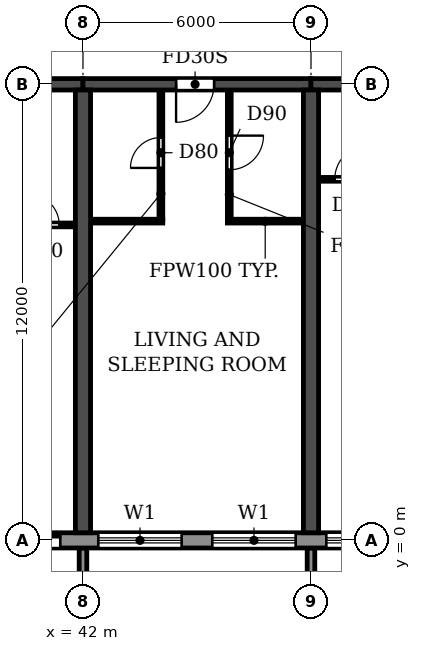
"""IFC4 building model, lengths in metres.
Left out: names, types, materials, properties, quantities, classifications, styles, units other than length and angle.
Written with IfcOpenShell. Run it as: python <this file> out.ifc"""

import sys

from ifc_helpers import new_model, si_unit, direction, frame, frame_2d, origin, place, context, subcontext, project, spatial, polyline, rectangle, outline, extrude, source, transform, mapped, element, fill, save


model = new_model("IFC4")
c1 = context("Model", 3, precision=1e-05, world=origin(), true_north=direction((0.0, 1.0)))
c2 = subcontext(c1, "Body", "Model", "MODEL_VIEW")
j1 = project(units=[si_unit("LENGTHUNIT", "METRE"), si_unit("PLANEANGLEUNIT", "RADIAN")], contexts=[c1])
p1 = place(None, origin())
s1 = spatial("IfcSite", under=j1, at=p1, CompositionType="ELEMENT")
p2 = place(p1, origin())
s2 = spatial("IfcBuilding", under=s1, at=p2, CompositionType="ELEMENT")
p3 = place(p2, frame((0.0, 0.0, 49.8)))
s3 = spatial("IfcBuildingStorey", under=s2, at=p3, CompositionType="ELEMENT", Elevation=49.8)
for number, where, z_axis, x_axis in (
    (1, (42.0, 0.2, 0.0), (0.0, 0.0, 1.0), (0.0, 1.0, 0.0)),
    (2, (48.0, 0.2, 0.0), (0.0, 0.0, 1.0), (0.0, 1.0, 0.0)),
):
    element("IfcWall", number, at=place(p3, frame(where, z_axis=z_axis, x_axis=x_axis)), inside=s3, PredefinedType="SHEAR", context=c2, shape_type="SweptSolid", body=[
        extrude(rectangle(XDim=11.65, YDim=0.4, at=frame_2d((5.825, 0.0))), origin(), (0.0, 0.0, 1.0), 3.0),
    ])
p4 = place(p3, frame((36.0, 12.0, 0.0), z_axis=(0.0, 0.0, 1.0), x_axis=(1.0, 0.0, 0.0)))
e3 = element("IfcWall", 3, at=p4, inside=s3, PredefinedType="SHEAR", context=c2, shape_type="SweptSolid", body=[
    extrude(rectangle(XDim=6.0, YDim=0.3, at=frame_2d((3.0, 0.0))), origin(), (0.0, 0.0, 1.0), 2.4),
])
p5 = place(p4, frame((2.55, 0.0, 0.0)))
e4 = element("IfcOpeningElement", 4, at=p5, cuts=e3, PredefinedType="OPENING", context=c2, shape_type="SweptSolid", body=[
    extrude(rectangle(XDim=1.0, YDim=2.1, at=frame_2d((0.5, 1.05))), frame((0.0, 0.16, 0.0), z_axis=(0.0, -1.0, 0.0), x_axis=(1.0, 0.0, 0.0)), (0.0, 0.0, 1.0), 0.32),
])
p6 = place(p3, frame((42.0, 12.0, 0.0), z_axis=(0.0, 0.0, 1.0), x_axis=(1.0, 0.0, 0.0)))
e5 = element("IfcWall", 5, at=p6, inside=s3, PredefinedType="SHEAR", context=c2, shape_type="SweptSolid", body=[
    extrude(rectangle(XDim=6.0, YDim=0.3, at=frame_2d((3.0, 0.0))), origin(), (0.0, 0.0, 1.0), 2.4),
])
p7 = place(p6, frame((2.45, 0.0, 0.0)))
e6 = element("IfcOpeningElement", 6, at=p7, cuts=e5, PredefinedType="OPENING", context=c2, shape_type="SweptSolid", body=[
    extrude(rectangle(XDim=1.0, YDim=2.1, at=frame_2d((0.5, 1.05))), frame((0.0, 0.16, 0.0), z_axis=(0.0, -1.0, 0.0), x_axis=(1.0, 0.0, 0.0)), (0.0, 0.0, 1.0), 0.32),
])
p8 = place(p3, frame((48.0, 12.0, 0.0), z_axis=(0.0, 0.0, 1.0), x_axis=(1.0, 0.0, 0.0)))
e7 = element("IfcWall", 7, at=p8, inside=s3, PredefinedType="SHEAR", context=c2, shape_type="SweptSolid", body=[
    extrude(rectangle(XDim=6.0, YDim=0.3, at=frame_2d((3.0, 0.0))), origin(), (0.0, 0.0, 1.0), 2.4),
])
p9 = place(p8, frame((2.55, 0.0, 0.0)))
e8 = element("IfcOpeningElement", 8, at=p9, cuts=e7, PredefinedType="OPENING", context=c2, shape_type="SweptSolid", body=[
    extrude(rectangle(XDim=1.0, YDim=2.1, at=frame_2d((0.5, 1.05))), frame((0.0, 0.16, 0.0), z_axis=(0.0, -1.0, 0.0), x_axis=(1.0, 0.0, 0.0)), (0.0, 0.0, 1.0), 0.32),
])
p10 = place(p3, frame((4.683, 0.0, 0.0), z_axis=(0.0, 0.0, 1.0), x_axis=(1.0, 0.0, 0.0)))
e9 = element("IfcWall", 9, at=p10, inside=s3, PredefinedType="STANDARD", context=c2, shape_type="SweptSolid", body=[
    extrude(rectangle(XDim=92.634, YDim=0.4, at=frame_2d((46.317, 0.0))), origin(), (0.0, 0.0, 1.0), 3.0),
])
p11 = place(p10, frame((1.717, 0.0, 0.9)))
e10 = element("IfcOpeningElement", 10, at=p11, cuts=e9, PredefinedType="OPENING", context=c2, shape_type="SweptSolid", body=[
    extrude(rectangle(XDim=2.2, YDim=1.5, at=frame_2d((1.1, 0.75))), frame((0.0, 0.21, 0.0), z_axis=(0.0, -1.0, 0.0), x_axis=(1.0, 0.0, 0.0)), (0.0, 0.0, 1.0), 0.42),
])
p12 = place(p10, frame((4.717, 0.0, 0.9)))
e11 = element("IfcOpeningElement", 11, at=p12, cuts=e9, PredefinedType="OPENING", context=c2, shape_type="SweptSolid", body=[
    extrude(rectangle(XDim=2.2, YDim=1.5, at=frame_2d((1.1, 0.75))), frame((0.0, 0.21, 0.0), z_axis=(0.0, -1.0, 0.0), x_axis=(1.0, 0.0, 0.0)), (0.0, 0.0, 1.0), 0.42),
])
p13 = place(p10, frame((7.717, 0.0, 0.9)))
e12 = element("IfcOpeningElement", 12, at=p13, cuts=e9, PredefinedType="OPENING", context=c2, shape_type="SweptSolid", body=[
    extrude(rectangle(XDim=2.2, YDim=1.5, at=frame_2d((1.1, 0.75))), frame((0.0, 0.21, 0.0), z_axis=(0.0, -1.0, 0.0), x_axis=(1.0, 0.0, 0.0)), (0.0, 0.0, 1.0), 0.42),
])
p14 = place(p10, frame((10.917, 0.0, 0.0)))
e13 = element("IfcOpeningElement", 13, at=p14, cuts=e9, PredefinedType="OPENING", context=c2, shape_type="SweptSolid", body=[
    extrude(rectangle(XDim=1.8, YDim=2.4, at=frame_2d((0.9, 1.2))), frame((0.0, 0.21, 0.0), z_axis=(0.0, -1.0, 0.0), x_axis=(1.0, 0.0, 0.0)), (0.0, 0.0, 1.0), 0.42),
])
p15 = place(p10, frame((13.717, 0.0, 0.9)))
e14 = element("IfcOpeningElement", 14, at=p15, cuts=e9, PredefinedType="OPENING", context=c2, shape_type="SweptSolid", body=[
    extrude(rectangle(XDim=2.2, YDim=1.5, at=frame_2d((1.1, 0.75))), frame((0.0, 0.21, 0.0), z_axis=(0.0, -1.0, 0.0), x_axis=(1.0, 0.0, 0.0)), (0.0, 0.0, 1.0), 0.42),
])
p16 = place(p10, frame((16.717, 0.0, 0.9)))
e15 = element("IfcOpeningElement", 15, at=p16, cuts=e9, PredefinedType="OPENING", context=c2, shape_type="SweptSolid", body=[
    extrude(rectangle(XDim=2.2, YDim=1.5, at=frame_2d((1.1, 0.75))), frame((0.0, 0.21, 0.0), z_axis=(0.0, -1.0, 0.0), x_axis=(1.0, 0.0, 0.0)), (0.0, 0.0, 1.0), 0.42),
])
p17 = place(p10, frame((19.917, 0.0, 0.0)))
e16 = element("IfcOpeningElement", 16, at=p17, cuts=e9, PredefinedType="OPENING", context=c2, shape_type="SweptSolid", body=[
    extrude(rectangle(XDim=1.8, YDim=2.4, at=frame_2d((0.9, 1.2))), frame((0.0, 0.21, 0.0), z_axis=(0.0, -1.0, 0.0), x_axis=(1.0, 0.0, 0.0)), (0.0, 0.0, 1.0), 0.42),
])
p18 = place(p10, frame((22.717, 0.0, 0.9)))
e17 = element("IfcOpeningElement", 17, at=p18, cuts=e9, PredefinedType="OPENING", context=c2, shape_type="SweptSolid", body=[
    extrude(rectangle(XDim=2.2, YDim=1.5, at=frame_2d((1.1, 0.75))), frame((0.0, 0.21, 0.0), z_axis=(0.0, -1.0, 0.0), x_axis=(1.0, 0.0, 0.0)), (0.0, 0.0, 1.0), 0.42),
])
p19 = place(p10, frame((25.717, 0.0, 0.9)))
e18 = element("IfcOpeningElement", 18, at=p19, cuts=e9, PredefinedType="OPENING", context=c2, shape_type="SweptSolid", body=[
    extrude(rectangle(XDim=2.2, YDim=1.5, at=frame_2d((1.1, 0.75))), frame((0.0, 0.21, 0.0), z_axis=(0.0, -1.0, 0.0), x_axis=(1.0, 0.0, 0.0)), (0.0, 0.0, 1.0), 0.42),
])
p20 = place(p10, frame((28.717, 0.0, 0.9)))
e19 = element("IfcOpeningElement", 19, at=p20, cuts=e9, PredefinedType="OPENING", context=c2, shape_type="SweptSolid", body=[
    extrude(rectangle(XDim=2.2, YDim=1.5, at=frame_2d((1.1, 0.75))), frame((0.0, 0.21, 0.0), z_axis=(0.0, -1.0, 0.0), x_axis=(1.0, 0.0, 0.0)), (0.0, 0.0, 1.0), 0.42),
])
p21 = place(p10, frame((31.717, 0.0, 0.9)))
e20 = element("IfcOpeningElement", 20, at=p21, cuts=e9, PredefinedType="OPENING", context=c2, shape_type="SweptSolid", body=[
    extrude(rectangle(XDim=2.2, YDim=1.5, at=frame_2d((1.1, 0.75))), frame((0.0, 0.21, 0.0), z_axis=(0.0, -1.0, 0.0), x_axis=(1.0, 0.0, 0.0)), (0.0, 0.0, 1.0), 0.42),
])
p22 = place(p10, frame((34.917, 0.0, 0.0)))
e21 = element("IfcOpeningElement", 21, at=p22, cuts=e9, PredefinedType="OPENING", context=c2, shape_type="SweptSolid", body=[
    extrude(rectangle(XDim=1.8, YDim=2.4, at=frame_2d((0.9, 1.2))), frame((0.0, 0.21, 0.0), z_axis=(0.0, -1.0, 0.0), x_axis=(1.0, 0.0, 0.0)), (0.0, 0.0, 1.0), 0.42),
])
p23 = place(p10, frame((37.717, 0.0, 0.9)))
e22 = element("IfcOpeningElement", 22, at=p23, cuts=e9, PredefinedType="OPENING", context=c2, shape_type="SweptSolid", body=[
    extrude(rectangle(XDim=2.2, YDim=1.5, at=frame_2d((1.1, 0.75))), frame((0.0, 0.21, 0.0), z_axis=(0.0, -1.0, 0.0), x_axis=(1.0, 0.0, 0.0)), (0.0, 0.0, 1.0), 0.42),
])
p24 = place(p10, frame((40.717, 0.0, 0.9)))
e23 = element("IfcOpeningElement", 23, at=p24, cuts=e9, PredefinedType="OPENING", context=c2, shape_type="SweptSolid", body=[
    extrude(rectangle(XDim=2.2, YDim=1.5, at=frame_2d((1.1, 0.75))), frame((0.0, 0.21, 0.0), z_axis=(0.0, -1.0, 0.0), x_axis=(1.0, 0.0, 0.0)), (0.0, 0.0, 1.0), 0.42),
])
p25 = place(p10, frame((43.717, 0.0, 0.9)))
e24 = element("IfcOpeningElement", 24, at=p25, cuts=e9, PredefinedType="OPENING", context=c2, shape_type="SweptSolid", body=[
    extrude(rectangle(XDim=2.2, YDim=1.5, at=frame_2d((1.1, 0.75))), frame((0.0, 0.21, 0.0), z_axis=(0.0, -1.0, 0.0), x_axis=(1.0, 0.0, 0.0)), (0.0, 0.0, 1.0), 0.42),
])
p26 = place(p10, frame((46.917, 0.0, 0.0)))
e25 = element("IfcOpeningElement", 25, at=p26, cuts=e9, PredefinedType="OPENING", context=c2, shape_type="SweptSolid", body=[
    extrude(rectangle(XDim=1.8, YDim=2.4, at=frame_2d((0.9, 1.2))), frame((0.0, 0.21, 0.0), z_axis=(0.0, -1.0, 0.0), x_axis=(1.0, 0.0, 0.0)), (0.0, 0.0, 1.0), 0.42),
])
p27 = place(p10, frame((49.717, 0.0, 0.9)))
e26 = element("IfcOpeningElement", 26, at=p27, cuts=e9, PredefinedType="OPENING", context=c2, shape_type="SweptSolid", body=[
    extrude(rectangle(XDim=2.2, YDim=1.5, at=frame_2d((1.1, 0.75))), frame((0.0, 0.21, 0.0), z_axis=(0.0, -1.0, 0.0), x_axis=(1.0, 0.0, 0.0)), (0.0, 0.0, 1.0), 0.42),
])
p28 = place(p10, frame((52.717, 0.0, 0.9)))
e27 = element("IfcOpeningElement", 27, at=p28, cuts=e9, PredefinedType="OPENING", context=c2, shape_type="SweptSolid", body=[
    extrude(rectangle(XDim=2.2, YDim=1.5, at=frame_2d((1.1, 0.75))), frame((0.0, 0.21, 0.0), z_axis=(0.0, -1.0, 0.0), x_axis=(1.0, 0.0, 0.0)), (0.0, 0.0, 1.0), 0.42),
])
p29 = place(p10, frame((55.717, 0.0, 0.9)))
e28 = element("IfcOpeningElement", 28, at=p29, cuts=e9, PredefinedType="OPENING", context=c2, shape_type="SweptSolid", body=[
    extrude(rectangle(XDim=2.2, YDim=1.5, at=frame_2d((1.1, 0.75))), frame((0.0, 0.21, 0.0), z_axis=(0.0, -1.0, 0.0), x_axis=(1.0, 0.0, 0.0)), (0.0, 0.0, 1.0), 0.42),
])
p30 = place(p10, frame((58.917, 0.0, 0.0)))
e29 = element("IfcOpeningElement", 29, at=p30, cuts=e9, PredefinedType="OPENING", context=c2, shape_type="SweptSolid", body=[
    extrude(rectangle(XDim=1.8, YDim=2.4, at=frame_2d((0.9, 1.2))), frame((0.0, 0.21, 0.0), z_axis=(0.0, -1.0, 0.0), x_axis=(1.0, 0.0, 0.0)), (0.0, 0.0, 1.0), 0.42),
])
p31 = place(p10, frame((61.717, 0.0, 0.9)))
e30 = element("IfcOpeningElement", 30, at=p31, cuts=e9, PredefinedType="OPENING", context=c2, shape_type="SweptSolid", body=[
    extrude(rectangle(XDim=2.2, YDim=1.5, at=frame_2d((1.1, 0.75))), frame((0.0, 0.21, 0.0), z_axis=(0.0, -1.0, 0.0), x_axis=(1.0, 0.0, 0.0)), (0.0, 0.0, 1.0), 0.42),
])
p32 = place(p10, frame((64.717, 0.0, 0.9)))
e31 = element("IfcOpeningElement", 31, at=p32, cuts=e9, PredefinedType="OPENING", context=c2, shape_type="SweptSolid", body=[
    extrude(rectangle(XDim=2.2, YDim=1.5, at=frame_2d((1.1, 0.75))), frame((0.0, 0.21, 0.0), z_axis=(0.0, -1.0, 0.0), x_axis=(1.0, 0.0, 0.0)), (0.0, 0.0, 1.0), 0.42),
])
p33 = place(p10, frame((67.717, 0.0, 0.9)))
e32 = element("IfcOpeningElement", 32, at=p33, cuts=e9, PredefinedType="OPENING", context=c2, shape_type="SweptSolid", body=[
    extrude(rectangle(XDim=2.2, YDim=1.5, at=frame_2d((1.1, 0.75))), frame((0.0, 0.21, 0.0), z_axis=(0.0, -1.0, 0.0), x_axis=(1.0, 0.0, 0.0)), (0.0, 0.0, 1.0), 0.42),
])
p34 = place(p10, frame((70.917, 0.0, 0.0)))
e33 = element("IfcOpeningElement", 33, at=p34, cuts=e9, PredefinedType="OPENING", context=c2, shape_type="SweptSolid", body=[
    extrude(rectangle(XDim=1.8, YDim=2.4, at=frame_2d((0.9, 1.2))), frame((0.0, 0.21, 0.0), z_axis=(0.0, -1.0, 0.0), x_axis=(1.0, 0.0, 0.0)), (0.0, 0.0, 1.0), 0.42),
])
p35 = place(p10, frame((73.717, 0.0, 0.9)))
e34 = element("IfcOpeningElement", 34, at=p35, cuts=e9, PredefinedType="OPENING", context=c2, shape_type="SweptSolid", body=[
    extrude(rectangle(XDim=2.2, YDim=1.5, at=frame_2d((1.1, 0.75))), frame((0.0, 0.21, 0.0), z_axis=(0.0, -1.0, 0.0), x_axis=(1.0, 0.0, 0.0)), (0.0, 0.0, 1.0), 0.42),
])
p36 = place(p10, frame((76.717, 0.0, 0.9)))
e35 = element("IfcOpeningElement", 35, at=p36, cuts=e9, PredefinedType="OPENING", context=c2, shape_type="SweptSolid", body=[
    extrude(rectangle(XDim=2.2, YDim=1.5, at=frame_2d((1.1, 0.75))), frame((0.0, 0.21, 0.0), z_axis=(0.0, -1.0, 0.0), x_axis=(1.0, 0.0, 0.0)), (0.0, 0.0, 1.0), 0.42),
])
p37 = place(p10, frame((79.717, 0.0, 0.9)))
e36 = element("IfcOpeningElement", 36, at=p37, cuts=e9, PredefinedType="OPENING", context=c2, shape_type="SweptSolid", body=[
    extrude(rectangle(XDim=2.2, YDim=1.5, at=frame_2d((1.1, 0.75))), frame((0.0, 0.21, 0.0), z_axis=(0.0, -1.0, 0.0), x_axis=(1.0, 0.0, 0.0)), (0.0, 0.0, 1.0), 0.42),
])
p38 = place(p10, frame((82.917, 0.0, 0.0)))
e37 = element("IfcOpeningElement", 37, at=p38, cuts=e9, PredefinedType="OPENING", context=c2, shape_type="SweptSolid", body=[
    extrude(rectangle(XDim=1.8, YDim=2.4, at=frame_2d((0.9, 1.2))), frame((0.0, 0.21, 0.0), z_axis=(0.0, -1.0, 0.0), x_axis=(1.0, 0.0, 0.0)), (0.0, 0.0, 1.0), 0.42),
])
p39 = place(p10, frame((85.717, 0.0, 0.9)))
e38 = element("IfcOpeningElement", 38, at=p39, cuts=e9, PredefinedType="OPENING", context=c2, shape_type="SweptSolid", body=[
    extrude(rectangle(XDim=2.2, YDim=1.5, at=frame_2d((1.1, 0.75))), frame((0.0, 0.21, 0.0), z_axis=(0.0, -1.0, 0.0), x_axis=(1.0, 0.0, 0.0)), (0.0, 0.0, 1.0), 0.42),
])
p40 = place(p10, frame((88.717, 0.0, 0.9)))
e39 = element("IfcOpeningElement", 39, at=p40, cuts=e9, PredefinedType="OPENING", context=c2, shape_type="SweptSolid", body=[
    extrude(rectangle(XDim=2.2, YDim=1.5, at=frame_2d((1.1, 0.75))), frame((0.0, 0.21, 0.0), z_axis=(0.0, -1.0, 0.0), x_axis=(1.0, 0.0, 0.0)), (0.0, 0.0, 1.0), 0.42),
])
m1 = source(origin(), c2, "Body", "SweptSolid", [
    extrude(outline(polyline([(0.0, 0.0), (0.2, 0.0), (0.2, 1.65), (0.0, 1.65), (0.0, 0.0)])), origin(), (0.0, 0.0, 1.0), 3.1),
])
for number, where in (
    (40, (41.9, -1.85, 0.0)),
    (41, (47.9, -1.85, 0.0)),
):
    element("IfcWall", number, at=place(p3, frame(where)), inside=s3, PredefinedType="STANDARD", context=c2, shape_type="MappedRepresentation", body=[
        mapped(m1, transform((0.0, 0.0, 0.0))),
    ])
p41 = place(p3, frame((39.9, 8.3, 0.0), z_axis=(0.0, 0.0, 1.0), x_axis=(1.0, 0.0, 0.0)))
e42 = element("IfcWall", 42, at=p41, inside=s3, PredefinedType="PARTITIONING", context=c2, shape_type="SweptSolid", body=[
    extrude(rectangle(XDim=1.89, YDim=0.1, at=frame_2d((0.945, 0.0))), origin(), (0.0, 0.0, 1.0), 3.0),
])
p42 = place(p41, frame((0.675, 0.0, 0.0)))
e43 = element("IfcOpeningElement", 43, at=p42, cuts=e42, PredefinedType="OPENING", context=c2, shape_type="SweptSolid", body=[
    extrude(rectangle(XDim=0.8, YDim=2.1, at=frame_2d((0.4, 1.05))), frame((0.0, 0.06, 0.0), z_axis=(0.0, -1.0, 0.0), x_axis=(1.0, 0.0, 0.0)), (0.0, 0.0, 1.0), 0.12),
])
p43 = place(p3, frame((42.21, 8.4, 0.0), z_axis=(0.0, 0.0, 1.0), x_axis=(1.0, 0.0, 0.0)))
e44 = element("IfcWall", 44, at=p43, inside=s3, PredefinedType="PARTITIONING", context=c2, shape_type="SweptSolid", body=[
    extrude(rectangle(XDim=1.89, YDim=0.1, at=frame_2d((0.945, 0.0))), origin(), (0.0, 0.0, 1.0), 3.0),
])
p44 = place(p3, frame((45.8, 8.4, 0.0), z_axis=(0.0, 0.0, 1.0), x_axis=(1.0, 0.0, 0.0)))
e45 = element("IfcWall", 45, at=p44, inside=s3, PredefinedType="PARTITIONING", context=c2, shape_type="SweptSolid", body=[
    extrude(rectangle(XDim=1.99, YDim=0.1, at=frame_2d((0.995, 0.0))), origin(), (0.0, 0.0, 1.0), 3.0),
])
p45 = place(p3, frame((48.21, 9.5, 0.0), z_axis=(0.0, 0.0, 1.0), x_axis=(1.0, 0.0, 0.0)))
e46 = element("IfcWall", 46, at=p45, inside=s3, PredefinedType="PARTITIONING", context=c2, shape_type="SweptSolid", body=[
    extrude(rectangle(XDim=1.99, YDim=0.1, at=frame_2d((0.995, 0.0))), origin(), (0.0, 0.0, 1.0), 3.0),
])
p46 = place(p45, frame((0.415, 0.0, 0.0)))
e47 = element("IfcOpeningElement", 47, at=p46, cuts=e46, PredefinedType="OPENING", context=c2, shape_type="SweptSolid", body=[
    extrude(rectangle(XDim=0.9, YDim=2.1, at=frame_2d((0.45, 1.05))), frame((0.0, 0.06, 0.0), z_axis=(0.0, -1.0, 0.0), x_axis=(1.0, 0.0, 0.0)), (0.0, 0.0, 1.0), 0.12),
])
p47 = place(p3, frame((44.05, 8.45, 0.0), z_axis=(0.0, 0.0, 1.0), x_axis=(0.0, 1.0, 0.0)))
e48 = element("IfcWall", 48, at=p47, inside=s3, PredefinedType="PARTITIONING", context=c2, shape_type="SweptSolid", body=[
    extrude(rectangle(XDim=3.39, YDim=0.1, at=frame_2d((1.695, 0.0))), origin(), (0.0, 0.0, 1.0), 3.0),
])
p48 = place(p47, frame((1.35, 0.0, 0.0)))
e49 = element("IfcOpeningElement", 49, at=p48, cuts=e48, PredefinedType="OPENING", context=c2, shape_type="SweptSolid", body=[
    extrude(rectangle(XDim=0.8, YDim=2.1, at=frame_2d((0.4, 1.05))), frame((0.0, 0.06, 0.0), z_axis=(0.0, -1.0, 0.0), x_axis=(1.0, 0.0, 0.0)), (0.0, 0.0, 1.0), 0.12),
])
p49 = place(p3, frame((45.85, 8.45, 0.0), z_axis=(0.0, 0.0, 1.0), x_axis=(0.0, 1.0, 0.0)))
e50 = element("IfcWall", 50, at=p49, inside=s3, PredefinedType="PARTITIONING", context=c2, shape_type="SweptSolid", body=[
    extrude(rectangle(XDim=3.39, YDim=0.1, at=frame_2d((1.695, 0.0))), origin(), (0.0, 0.0, 1.0), 3.0),
])
p50 = place(p49, frame((1.3, 0.0, 0.0)))
e51 = element("IfcOpeningElement", 51, at=p50, cuts=e50, PredefinedType="OPENING", context=c2, shape_type="SweptSolid", body=[
    extrude(rectangle(XDim=0.9, YDim=2.1, at=frame_2d((0.45, 1.05))), frame((0.0, 0.06, 0.0), z_axis=(0.0, -1.0, 0.0), x_axis=(1.0, 0.0, 0.0)), (0.0, 0.0, 1.0), 0.12),
])
p51 = place(p22, origin())
e52 = element("IfcDoor", 52, at=p51, inside=s3, OperationType="DOUBLE_DOOR_SLIDING", PredefinedType="DOOR", context=c2, shape_type="SweptSolid", body=[
    extrude(rectangle(XDim=1.8, YDim=2.4, at=frame_2d((0.9, 1.2))), frame((0.0, 0.025, 0.0), z_axis=(0.0, -1.0, 0.0), x_axis=(1.0, 0.0, 0.0)), (0.0, 0.0, 1.0), 0.05),
])
fill(e21, e52)
p52 = place(p23, origin())
e53 = element("IfcWindow", 53, at=p52, inside=s3, PartitioningType="DOUBLE_PANEL_HORIZONTAL", PredefinedType="WINDOW", context=c2, shape_type="SweptSolid", body=[
    extrude(rectangle(XDim=2.2, YDim=1.5, at=frame_2d((1.1, 0.75))), frame((0.0, 0.03, 0.0), z_axis=(0.0, -1.0, 0.0), x_axis=(1.0, 0.0, 0.0)), (0.0, 0.0, 1.0), 0.06),
])
fill(e22, e53)
p53 = place(p24, origin())
e54 = element("IfcWindow", 54, at=p53, inside=s3, PartitioningType="DOUBLE_PANEL_HORIZONTAL", PredefinedType="WINDOW", context=c2, shape_type="SweptSolid", body=[
    extrude(rectangle(XDim=2.2, YDim=1.5, at=frame_2d((1.1, 0.75))), frame((0.0, 0.03, 0.0), z_axis=(0.0, -1.0, 0.0), x_axis=(1.0, 0.0, 0.0)), (0.0, 0.0, 1.0), 0.06),
])
fill(e23, e54)
p54 = place(p25, origin())
e55 = element("IfcWindow", 55, at=p54, inside=s3, PartitioningType="DOUBLE_PANEL_HORIZONTAL", PredefinedType="WINDOW", context=c2, shape_type="SweptSolid", body=[
    extrude(rectangle(XDim=2.2, YDim=1.5, at=frame_2d((1.1, 0.75))), frame((0.0, 0.03, 0.0), z_axis=(0.0, -1.0, 0.0), x_axis=(1.0, 0.0, 0.0)), (0.0, 0.0, 1.0), 0.06),
])
fill(e24, e55)
p55 = place(p42, origin())
e56 = element("IfcDoor", 56, at=p55, inside=s3, OperationType="SINGLE_SWING_LEFT", PredefinedType="DOOR", context=c2, shape_type="SweptSolid", body=[
    extrude(rectangle(XDim=0.8, YDim=2.1, at=frame_2d((0.4, 1.05))), frame((0.0, 0.025, 0.0), z_axis=(0.0, -1.0, 0.0), x_axis=(1.0, 0.0, 0.0)), (0.0, 0.0, 1.0), 0.05),
])
fill(e43, e56)
p56 = place(p48, origin())
e57 = element("IfcDoor", 57, at=p56, inside=s3, OperationType="SINGLE_SWING_LEFT", PredefinedType="DOOR", context=c2, shape_type="SweptSolid", body=[
    extrude(rectangle(XDim=0.8, YDim=2.1, at=frame_2d((0.4, 1.05))), frame((0.0, 0.025, 0.0), z_axis=(0.0, -1.0, 0.0), x_axis=(1.0, 0.0, 0.0)), (0.0, 0.0, 1.0), 0.05),
])
fill(e49, e57)
p57 = place(p7, frame((1.0, 0.0, 0.0), z_axis=(0.0, 0.0, 1.0), x_axis=(-1.0, 0.0, 0.0)))
e58 = element("IfcDoor", 58, at=p57, inside=s3, OperationType="SINGLE_SWING_RIGHT", PredefinedType="DOOR", context=c2, shape_type="SweptSolid", body=[
    extrude(rectangle(XDim=1.0, YDim=2.1, at=frame_2d((0.5, 1.05))), frame((0.0, 0.025, 0.0), z_axis=(0.0, -1.0, 0.0), x_axis=(1.0, 0.0, 0.0)), (0.0, 0.0, 1.0), 0.05),
])
fill(e6, e58)
p58 = place(p50, frame((0.9, 0.0, 0.0), z_axis=(0.0, 0.0, 1.0), x_axis=(-1.0, 0.0, 0.0)))
e59 = element("IfcDoor", 59, at=p58, inside=s3, OperationType="SINGLE_SWING_LEFT", PredefinedType="DOOR", context=c2, shape_type="SweptSolid", body=[
    extrude(rectangle(XDim=0.9, YDim=2.1, at=frame_2d((0.45, 1.05))), frame((0.0, 0.025, 0.0), z_axis=(0.0, -1.0, 0.0), x_axis=(1.0, 0.0, 0.0)), (0.0, 0.0, 1.0), 0.05),
])
fill(e51, e59)
p59 = place(p46, origin())
e60 = element("IfcDoor", 60, at=p59, inside=s3, OperationType="SINGLE_SWING_RIGHT", PredefinedType="DOOR", context=c2, shape_type="SweptSolid", body=[
    extrude(rectangle(XDim=0.9, YDim=2.1, at=frame_2d((0.45, 1.05))), frame((0.0, 0.025, 0.0), z_axis=(0.0, -1.0, 0.0), x_axis=(1.0, 0.0, 0.0)), (0.0, 0.0, 1.0), 0.05),
])
fill(e47, e60)
save(model, sys.argv[1])
